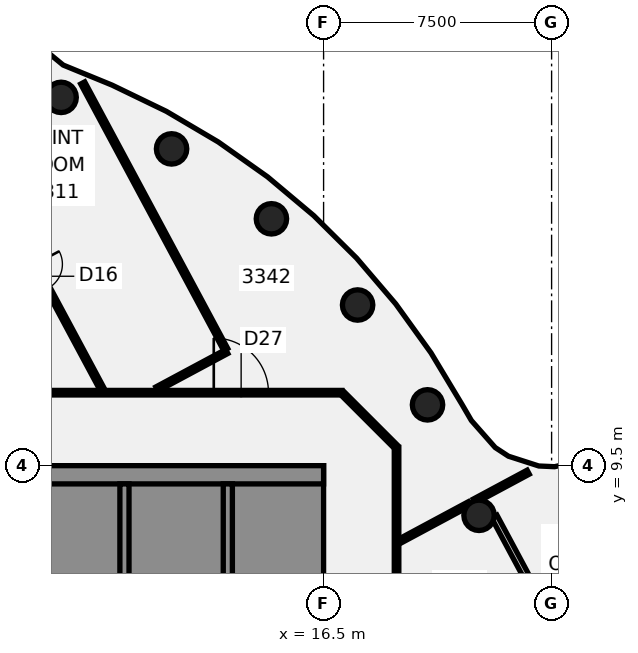
"""IFC4 building model, lengths in metres.
Left out: names, types, materials, properties, quantities, classifications, styles, units other than length and angle.
Written with IfcOpenShell. Run it as: python <this file> out.ifc"""

import sys

from ifc_helpers import new_model, si_unit, direction, frame, frame_2d, origin, origin_2d, place, context, subcontext, project, spatial, polyline, rectangle, circle, outline, extrude, element, fill, save


model = new_model("IFC4")
c1 = context("Model", 3, precision=1e-05, world=origin(), true_north=direction((0.0, 1.0)))
c2 = subcontext(c1, "Body", "Model", "MODEL_VIEW")
j1 = project(units=[si_unit("LENGTHUNIT", "METRE"), si_unit("PLANEANGLEUNIT", "RADIAN")], contexts=[c1])
p1 = place(None, origin())
s1 = spatial("IfcSite", under=j1, at=p1, CompositionType="ELEMENT")
p2 = place(p1, origin())
s2 = spatial("IfcBuilding", under=s1, at=p2, CompositionType="ELEMENT")
p3 = place(p2, frame((0.0, 0.0, 136.75)))
s3 = spatial("IfcBuildingStorey", under=s2, at=p3, CompositionType="ELEMENT", Elevation=136.75)
for number, where, z_axis, x_axis in (
    (1, (21.613, 7.866, -0.14), (0.0, 0.0, 1.0), (1.0, 0.0, 0.0)),
    (2, (19.919, 11.5, -0.14), (0.0, 0.0, 1.0), (1.0, 0.0, 0.0)),
    (3, (17.619, 14.784, -0.14), (0.0, 0.0, 1.0), (1.0, 0.0, 0.0)),
    (4, (14.784, 17.619, -0.14), (0.0, 0.0, 1.0), (1.0, 0.0, 0.0)),
    (5, (11.5, 19.919, -0.14), (0.0, 0.0, 1.0), (1.0, 0.0, 0.0)),
    (6, (7.866, 21.613, -0.14), (0.0, 0.0, 1.0), (1.0, 0.0, 0.0)),
):
    element("IfcColumn", number, at=place(p3, frame(where, z_axis=z_axis, x_axis=x_axis)), inside=s3, PredefinedType="COLUMN", context=c2, shape_type="SweptSolid", body=[
        extrude(circle(Radius=0.5, at=origin_2d()), origin(), (0.0, 0.0, 1.0), 3.75),
    ])
p4 = place(p3, frame((3.748, 22.207, 0.0), z_axis=(0.0, 0.0, 1.0), x_axis=(0.472684868369, -0.881231533262, 0.0)))
e7 = element("IfcWall", 7, at=p4, inside=s3, PredefinedType="PARTITIONING", context=c2, shape_type="SweptSolid", body=[
    extrude(rectangle(XDim=11.591, YDim=0.15, at=frame_2d((5.795, 0.0))), origin(), (0.0, 0.0, 1.0), 3.01),
])
p5 = place(p4, frame((6.9, 0.0, 0.0)))
e8 = element("IfcOpeningElement", 8, at=p5, cuts=e7, PredefinedType="OPENING", context=c2, shape_type="SweptSolid", body=[
    extrude(rectangle(XDim=0.9, YDim=2.1, at=frame_2d((0.45, 1.05))), frame((0.0, 0.085, 0.0), z_axis=(0.0, -1.0, 0.0), x_axis=(1.0, 0.0, 0.0)), (0.0, 0.0, 1.0), 0.17),
])
p6 = place(p3, frame((8.577, 22.087, 0.0), z_axis=(0.0, 0.0, 1.0), x_axis=(0.472681056818, -0.881233577734, 0.0)))
e9 = element("IfcWall", 9, at=p6, inside=s3, PredefinedType="PARTITIONING", context=c2, shape_type="SweptSolid", body=[
    extrude(rectangle(XDim=9.948, YDim=0.15, at=frame_2d((4.974, 0.0))), origin(), (0.0, 0.0, 1.0), 3.01),
])
p7 = place(p3, frame((22.113, 7.829, 0.0), z_axis=(0.0, 0.0, 1.0), x_axis=(0.472548012719, -0.881304927749, 0.0)))
e10 = element("IfcWall", 10, at=p7, inside=s3, PredefinedType="PARTITIONING", context=c2, shape_type="SweptSolid", body=[
    extrude(rectangle(XDim=13.544, YDim=0.2, at=frame_2d((6.772, 0.0))), origin(), (0.0, 0.0, 1.0), 3.01),
])
p8 = place(p7, frame((5.945, 0.0, 0.0)))
e11 = element("IfcOpeningElement", 11, at=p8, cuts=e10, PredefinedType="OPENING", context=c2, shape_type="SweptSolid", body=[
    extrude(rectangle(XDim=1.4, YDim=2.1, at=frame_2d((0.7, 1.05))), frame((0.0, 0.11, 0.0), z_axis=(0.0, -1.0, 0.0), x_axis=(1.0, 0.0, 0.0)), (0.0, 0.0, 1.0), 0.22),
])
p9 = place(p3, frame((17.128, 11.872, 0.0), z_axis=(0.0, 0.0, 1.0), x_axis=(0.707106781187, -0.707106781187, 0.0)))
e12 = element("IfcWall", 12, at=p9, inside=s3, PredefinedType="PARTITIONING", context=c2, shape_type="SweptSolid", body=[
    extrude(rectangle(XDim=2.465, YDim=0.15, at=frame_2d((1.232, 0.0))), origin(), (0.0, 0.0, 1.0), 3.01),
])
p10 = place(p3, frame((-17.065, 11.9, 0.0), z_axis=(0.0, 0.0, 1.0), x_axis=(1.0, 0.0, 0.0)))
e13 = element("IfcWall", 13, at=p10, inside=s3, PredefinedType="PARTITIONING", context=c2, shape_type="SweptSolid", body=[
    extrude(rectangle(XDim=34.165, YDim=0.15, at=frame_2d((17.083, 0.0))), origin(), (0.0, 0.0, 1.0), 3.01),
])
p11 = place(p10, frame((21.624, 0.0, 0.0)))
e14 = element("IfcOpeningElement", 14, at=p11, cuts=e13, PredefinedType="OPENING", context=c2, shape_type="SweptSolid", body=[
    extrude(rectangle(XDim=1.8, YDim=2.1, at=frame_2d((0.9, 1.05))), frame((0.0, 0.085, 0.0), z_axis=(0.0, -1.0, 0.0), x_axis=(1.0, 0.0, 0.0)), (0.0, 0.0, 1.0), 0.17),
])
p12 = place(p10, frame((29.953, 0.0, 0.0)))
e15 = element("IfcOpeningElement", 15, at=p12, cuts=e13, PredefinedType="OPENING", context=c2, shape_type="SweptSolid", body=[
    extrude(rectangle(XDim=1.8, YDim=2.1, at=frame_2d((0.9, 1.05))), frame((0.0, 0.085, 0.0), z_axis=(0.0, -1.0, 0.0), x_axis=(1.0, 0.0, 0.0)), (0.0, 0.0, 1.0), 0.17),
])
p13 = place(p10, frame((6.115, 0.0, 0.0)))
e16 = element("IfcOpeningElement", 16, at=p13, cuts=e13, PredefinedType="OPENING", context=c2, shape_type="SweptSolid", body=[
    extrude(rectangle(XDim=1.8, YDim=2.1, at=frame_2d((0.9, 1.05))), frame((0.0, 0.085, 0.0), z_axis=(0.0, -1.0, 0.0), x_axis=(1.0, 0.0, 0.0)), (0.0, 0.0, 1.0), 0.17),
])
p14 = place(p3, frame((11.017, 12.023, 0.0), z_axis=(0.0, 0.0, 1.0), x_axis=(0.881329583371, 0.472502026954, 0.0)))
e17 = element("IfcWall", 17, at=p14, inside=s3, PredefinedType="PARTITIONING", context=c2, shape_type="SweptSolid", body=[
    extrude(rectangle(XDim=2.607, YDim=0.15, at=frame_2d((1.304, 0.0))), origin(), (0.0, 0.0, 1.0), 3.01),
])
p15 = place(p3, frame((18.992, 7.011, 0.0), z_axis=(0.0, 0.0, 1.0), x_axis=(0.881120441444, 0.472891919648, 0.0)))
e18 = element("IfcWall", 18, at=p15, inside=s3, PredefinedType="PARTITIONING", context=c2, shape_type="SweptSolid", body=[
    extrude(rectangle(XDim=2.616, YDim=0.15, at=frame_2d((1.308, 0.0))), origin(), (0.0, 0.0, 1.0), 3.01),
])
p16 = place(p3, frame((21.461, 8.336, 0.0), z_axis=(0.0, 0.0, 1.0), x_axis=(0.881087345863, 0.472953580133, 0.0)))
e19 = element("IfcWall", 19, at=p16, inside=s3, PredefinedType="PARTITIONING", context=c2, shape_type="SweptSolid", body=[
    extrude(rectangle(XDim=2.008, YDim=0.15, at=frame_2d((1.004, 0.0))), origin(), (0.0, 0.0, 1.0), 3.01),
])
p17 = place(p3, frame((18.9, -10.1, 0.0), z_axis=(0.0, 0.0, 1.0), x_axis=(0.0, 1.0, 0.0)))
e20 = element("IfcWall", 20, at=p17, inside=s3, PredefinedType="PARTITIONING", context=c2, shape_type="SweptSolid", body=[
    extrude(rectangle(XDim=20.2, YDim=0.15, at=frame_2d((10.1, 0.0))), origin(), (0.0, 0.0, 1.0), 3.01),
])
p18 = place(p17, frame((8.479, 0.0, 0.0)))
e21 = element("IfcOpeningElement", 21, at=p18, cuts=e20, PredefinedType="OPENING", context=c2, shape_type="SweptSolid", body=[
    extrude(rectangle(XDim=1.8, YDim=2.1, at=frame_2d((0.9, 1.05))), frame((0.0, 0.085, 0.0), z_axis=(0.0, -1.0, 0.0), x_axis=(1.0, 0.0, 0.0)), (0.0, 0.0, 1.0), 0.17),
])
p19 = place(p17, frame((13.645, 0.0, 0.0)))
e22 = element("IfcOpeningElement", 22, at=p19, cuts=e20, PredefinedType="OPENING", context=c2, shape_type="SweptSolid", body=[
    extrude(rectangle(XDim=0.9, YDim=2.1, at=frame_2d((0.45, 1.05))), frame((0.0, 0.085, 0.0), z_axis=(0.0, -1.0, 0.0), x_axis=(1.0, 0.0, 0.0)), (0.0, 0.0, 1.0), 0.17),
])
p20 = place(p3, origin())
e23 = element("IfcWall", 23, at=p20, inside=s3, PredefinedType="SHEAR", context=c2, shape_type="SweptSolid", body=[
    extrude(outline(polyline([(13.5, -8.125), (13.5, -8.9), (15.9, -8.9), (16.5, -8.9), (16.5, 8.9), (15.9, 8.9), (13.5, 8.9), (13.5, 8.125), (15.9, 8.125), (15.9, 5.625), (13.5, 5.625), (13.5, 5.375), (15.9, 5.375), (15.9, -5.375), (13.5, -5.375), (13.5, -5.625), (15.9, -5.625), (15.9, -8.125), (13.5, -8.125)])), origin(), (0.0, 0.0, 1.0), 3.61),
])
p21 = place(p3, frame((16.5, 9.2, 0.0), z_axis=(0.0, 0.0, 1.0), x_axis=(-1.0, 0.0, 0.0)))
e24 = element("IfcWall", 24, at=p21, inside=s3, PredefinedType="SHEAR", context=c2, shape_type="SweptSolid", body=[
    extrude(rectangle(XDim=13.0, YDim=0.6, at=frame_2d((6.5, 0.0))), origin(), (0.0, 0.0, 1.0), 3.61),
])
p22 = place(p3, origin())
e25 = element("IfcWall", 25, at=p22, inside=s3, PredefinedType="SHEAR", context=c2, shape_type="SweptSolid", body=[
    extrude(outline(polyline([(9.8, -5.375), (7.5, -5.375), (7.5, -2.875), (9.8, -2.875), (9.8, -2.625), (7.5, -2.625), (7.5, -0.125), (9.8, -0.125), (9.8, 0.125), (7.5, 0.125), (7.5, 2.625), (9.8, 2.625), (9.8, 2.875), (7.5, 2.875), (7.5, 5.375), (9.8, 5.375), (9.8, 5.625), (7.5, 5.625), (7.5, 8.125), (9.8, 8.125), (9.8, 8.9), (7.5, 8.9), (7.2, 8.9), (7.2, -5.625), (7.5, -5.625), (9.8, -5.625), (9.8, -5.375)])), origin(), (0.0, 0.0, 1.0), 3.61),
])
p23 = place(p3, frame((13.35, -8.9, 0.0), z_axis=(0.0, 0.0, 1.0), x_axis=(0.0, 1.0, 0.0)))
e26 = element("IfcWall", 26, at=p23, inside=s3, PredefinedType="SHEAR", context=c2, shape_type="SweptSolid", body=[
    extrude(rectangle(XDim=17.8, YDim=0.3, at=frame_2d((8.9, 0.0))), origin(), (0.0, 0.0, 1.0), 3.61),
])
p24 = place(p23, frame((1.325, 0.0, 0.0)))
e27 = element("IfcOpeningElement", 27, at=p24, cuts=e26, PredefinedType="OPENING", context=c2, shape_type="SweptSolid", body=[
    extrude(rectangle(XDim=1.4, YDim=2.1, at=frame_2d((0.7, 1.05))), frame((0.0, 0.16, 0.0), z_axis=(0.0, -1.0, 0.0), x_axis=(1.0, 0.0, 0.0)), (0.0, 0.0, 1.0), 0.32),
])
p25 = place(p23, frame((6.546, 0.0, 0.0)))
e28 = element("IfcOpeningElement", 28, at=p25, cuts=e26, PredefinedType="OPENING", context=c2, shape_type="SweptSolid", body=[
    extrude(rectangle(XDim=1.0, YDim=2.1, at=frame_2d((0.5, 1.05))), frame((0.0, 0.16, 0.0), z_axis=(0.0, -1.0, 0.0), x_axis=(1.0, 0.0, 0.0)), (0.0, 0.0, 1.0), 0.32),
])
p26 = place(p23, frame((12.046, 0.0, 0.0)))
e29 = element("IfcOpeningElement", 29, at=p26, cuts=e26, PredefinedType="OPENING", context=c2, shape_type="SweptSolid", body=[
    extrude(rectangle(XDim=1.0, YDim=2.1, at=frame_2d((0.5, 1.05))), frame((0.0, 0.16, 0.0), z_axis=(0.0, -1.0, 0.0), x_axis=(1.0, 0.0, 0.0)), (0.0, 0.0, 1.0), 0.32),
])
p27 = place(p3, frame((9.95, -8.9, 0.0), z_axis=(0.0, 0.0, 1.0), x_axis=(0.0, 1.0, 0.0)))
e30 = element("IfcWall", 30, at=p27, inside=s3, PredefinedType="SHEAR", context=c2, shape_type="SweptSolid", body=[
    extrude(rectangle(XDim=17.8, YDim=0.3, at=frame_2d((8.9, 0.0))), origin(), (0.0, 0.0, 1.0), 3.61),
])
p28 = place(p27, frame((4.175, 0.0, 0.0)))
e31 = element("IfcOpeningElement", 31, at=p28, cuts=e30, PredefinedType="OPENING", context=c2, shape_type="SweptSolid", body=[
    extrude(rectangle(XDim=1.2, YDim=2.1, at=frame_2d((0.6, 1.05))), frame((0.0, 0.16, 0.0), z_axis=(0.0, -1.0, 0.0), x_axis=(1.0, 0.0, 0.0)), (0.0, 0.0, 1.0), 0.32),
])
p29 = place(p27, frame((6.925, 0.0, 0.0)))
e32 = element("IfcOpeningElement", 32, at=p29, cuts=e30, PredefinedType="OPENING", context=c2, shape_type="SweptSolid", body=[
    extrude(rectangle(XDim=1.2, YDim=2.1, at=frame_2d((0.6, 1.05))), frame((0.0, 0.16, 0.0), z_axis=(0.0, -1.0, 0.0), x_axis=(1.0, 0.0, 0.0)), (0.0, 0.0, 1.0), 0.32),
])
p30 = place(p12, origin())
e33 = element("IfcDoor", 33, at=p30, inside=s3, OperationType="DOUBLE_DOOR_SINGLE_SWING", PredefinedType="DOOR", context=c2, shape_type="SweptSolid", body=[
    extrude(rectangle(XDim=1.8, YDim=2.1, at=frame_2d((0.9, 1.05))), frame((0.0, 0.025, 0.0), z_axis=(0.0, -1.0, 0.0), x_axis=(1.0, 0.0, 0.0)), (0.0, 0.0, 1.0), 0.05),
])
fill(e15, e33)
save(model, sys.argv[1])
